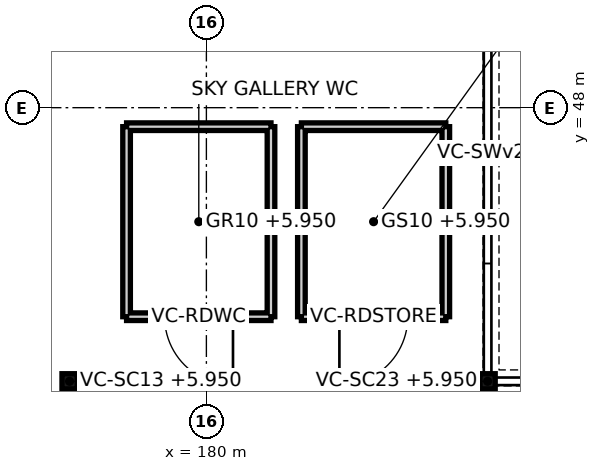
"""IFC4 building model, lengths in metres.
Left out: names, types, materials, properties, quantities, classifications, styles, units other than length and angle.
Written with IfcOpenShell. Run it as: python <this file> out.ifc"""

import sys

from ifc_helpers import new_model, si_unit, direction, frame, frame_2d, origin, origin_2d, place, context, subcontext, project, spatial, polyline, rectangle, hollow_rectangle, outline, extrude, element, fill, save


model = new_model("IFC4")
c1 = context("Model", 3, precision=1e-05, world=origin(), true_north=direction((0.0, 1.0)))
c2 = subcontext(c1, "Body", "Model", "MODEL_VIEW")
j1 = project(units=[si_unit("LENGTHUNIT", "METRE"), si_unit("PLANEANGLEUNIT", "RADIAN")], contexts=[c1])
p1 = place(None, origin())
s1 = spatial("IfcSite", under=j1, at=p1, CompositionType="ELEMENT")
p2 = place(p1, origin())
s2 = spatial("IfcBuilding", under=s1, at=p2, CompositionType="ELEMENT")
p3 = place(p2, frame((0.0, 0.0, 6.0)))
s3 = spatial("IfcBuildingStorey", under=s2, at=p3, CompositionType="ELEMENT", Elevation=6.0)
for number, where, z_axis, x_axis in (
    (1, (178.2, 44.4, -0.05), (0.0, 0.0, 1.0), (1.0, 0.0, 0.0)),
    (2, (183.7, 44.4, -0.05), (0.0, 0.0, 1.0), (1.0, 0.0, 0.0)),
):
    element("IfcColumn", number, at=place(p3, frame(where, z_axis=z_axis, x_axis=x_axis)), inside=s3, PredefinedType="COLUMN", context=c2, shape_type="SweptSolid", body=[
        extrude(hollow_rectangle(XDim=0.2, YDim=0.2, WallThickness=0.01, at=origin_2d()), origin(), (0.0, 0.0, 1.0), 4.21),
    ])
p4 = place(p3, frame((178.95, 45.25, -0.05), z_axis=(0.0, 0.0, 1.0), x_axis=(1.0, 0.0, 0.0)))
e3 = element("IfcWall", 3, at=p4, inside=s3, PredefinedType="PARTITIONING", context=c2, shape_type="SweptSolid", body=[
    extrude(outline(polyline([(-0.05, -0.05), (1.95, -0.05), (1.85, 0.05), (0.05, 0.05), (-0.05, -0.05)])), origin(), (0.0, 0.0, 1.0), 4.45),
])
p5 = place(p4, frame((0.5, 0.0, 0.05)))
e4 = element("IfcOpeningElement", 4, at=p5, cuts=e3, PredefinedType="OPENING", context=c2, shape_type="SweptSolid", body=[
    extrude(rectangle(XDim=0.9, YDim=2.1, at=frame_2d((0.45, 1.05))), frame((0.0, 0.06, 0.0), z_axis=(0.0, -1.0, 0.0), x_axis=(1.0, 0.0, 0.0)), (0.0, 0.0, 1.0), 0.12),
])
p6 = place(p3, frame((180.85, 45.25, -0.05), z_axis=(0.0, 0.0, 1.0), x_axis=(0.0, 1.0, 0.0)))
e5 = element("IfcWall", 5, at=p6, inside=s3, PredefinedType="PARTITIONING", context=c2, shape_type="SweptSolid", body=[
    extrude(outline(polyline([(-0.05, -0.05), (2.55, -0.05), (2.45, 0.05), (0.05, 0.05), (-0.05, -0.05)])), origin(), (0.0, 0.0, 1.0), 4.45),
])
p7 = place(p3, frame((180.85, 47.75, -0.05), z_axis=(0.0, 0.0, 1.0), x_axis=(-1.0, 0.0, 0.0)))
e6 = element("IfcWall", 6, at=p7, inside=s3, PredefinedType="PARTITIONING", context=c2, shape_type="SweptSolid", body=[
    extrude(outline(polyline([(-0.05, -0.05), (1.95, -0.05), (1.85, 0.05), (0.05, 0.05), (-0.05, -0.05)])), origin(), (0.0, 0.0, 1.0), 4.45),
])
p8 = place(p3, frame((178.95, 47.75, -0.05), z_axis=(0.0, 0.0, 1.0), x_axis=(0.0, -1.0, 0.0)))
e7 = element("IfcWall", 7, at=p8, inside=s3, PredefinedType="PARTITIONING", context=c2, shape_type="SweptSolid", body=[
    extrude(outline(polyline([(-0.05, -0.05), (2.55, -0.05), (2.45, 0.05), (0.05, 0.05), (-0.05, -0.05)])), origin(), (0.0, 0.0, 1.0), 4.45),
])
p9 = place(p3, frame((181.25, 45.25, -0.05), z_axis=(0.0, 0.0, 1.0), x_axis=(1.0, 0.0, 0.0)))
e8 = element("IfcWall", 8, at=p9, inside=s3, PredefinedType="PARTITIONING", context=c2, shape_type="SweptSolid", body=[
    extrude(outline(polyline([(-0.05, -0.05), (1.95, -0.05), (1.85, 0.05), (0.05, 0.05), (-0.05, -0.05)])), origin(), (0.0, 0.0, 1.0), 4.45),
])
p10 = place(p9, frame((0.5, 0.0, 0.05)))
e9 = element("IfcOpeningElement", 9, at=p10, cuts=e8, PredefinedType="OPENING", context=c2, shape_type="SweptSolid", body=[
    extrude(rectangle(XDim=0.9, YDim=2.1, at=frame_2d((0.45, 1.05))), frame((0.0, 0.06, 0.0), z_axis=(0.0, -1.0, 0.0), x_axis=(1.0, 0.0, 0.0)), (0.0, 0.0, 1.0), 0.12),
])
p11 = place(p3, frame((183.15, 45.25, -0.05), z_axis=(0.0, 0.0, 1.0), x_axis=(0.0, 1.0, 0.0)))
e10 = element("IfcWall", 10, at=p11, inside=s3, PredefinedType="PARTITIONING", context=c2, shape_type="SweptSolid", body=[
    extrude(outline(polyline([(-0.05, -0.05), (2.55, -0.05), (2.45, 0.05), (0.05, 0.05), (-0.05, -0.05)])), origin(), (0.0, 0.0, 1.0), 4.45),
])
p12 = place(p3, frame((183.15, 47.75, -0.05), z_axis=(0.0, 0.0, 1.0), x_axis=(-1.0, 0.0, 0.0)))
e11 = element("IfcWall", 11, at=p12, inside=s3, PredefinedType="PARTITIONING", context=c2, shape_type="SweptSolid", body=[
    extrude(outline(polyline([(-0.05, -0.05), (1.95, -0.05), (1.85, 0.05), (0.05, 0.05), (-0.05, -0.05)])), origin(), (0.0, 0.0, 1.0), 4.45),
])
p13 = place(p3, frame((181.25, 47.75, -0.05), z_axis=(0.0, 0.0, 1.0), x_axis=(0.0, -1.0, 0.0)))
e12 = element("IfcWall", 12, at=p13, inside=s3, PredefinedType="PARTITIONING", context=c2, shape_type="SweptSolid", body=[
    extrude(outline(polyline([(-0.05, -0.05), (2.55, -0.05), (2.45, 0.05), (0.05, 0.05), (-0.05, -0.05)])), origin(), (0.0, 0.0, 1.0), 4.45),
])
p14 = place(p5, frame((0.9, 0.0, 0.0), z_axis=(0.0, 0.0, 1.0), x_axis=(-1.0, 0.0, 0.0)))
e13 = element("IfcDoor", 13, at=p14, inside=s3, OperationType="SINGLE_SWING_LEFT", PredefinedType="DOOR", context=c2, shape_type="SweptSolid", body=[
    extrude(rectangle(XDim=0.9, YDim=2.1, at=frame_2d((0.45, 1.05))), frame((0.0, 0.025, 0.0), z_axis=(0.0, -1.0, 0.0), x_axis=(1.0, 0.0, 0.0)), (0.0, 0.0, 1.0), 0.05),
])
fill(e4, e13)
p15 = place(p10, frame((0.9, 0.0, 0.0), z_axis=(0.0, 0.0, 1.0), x_axis=(-1.0, 0.0, 0.0)))
e14 = element("IfcDoor", 14, at=p15, inside=s3, OperationType="SINGLE_SWING_RIGHT", PredefinedType="DOOR", context=c2, shape_type="SweptSolid", body=[
    extrude(rectangle(XDim=0.9, YDim=2.1, at=frame_2d((0.45, 1.05))), frame((0.0, 0.025, 0.0), z_axis=(0.0, -1.0, 0.0), x_axis=(1.0, 0.0, 0.0)), (0.0, 0.0, 1.0), 0.05),
])
fill(e9, e14)
save(model, sys.argv[1])
